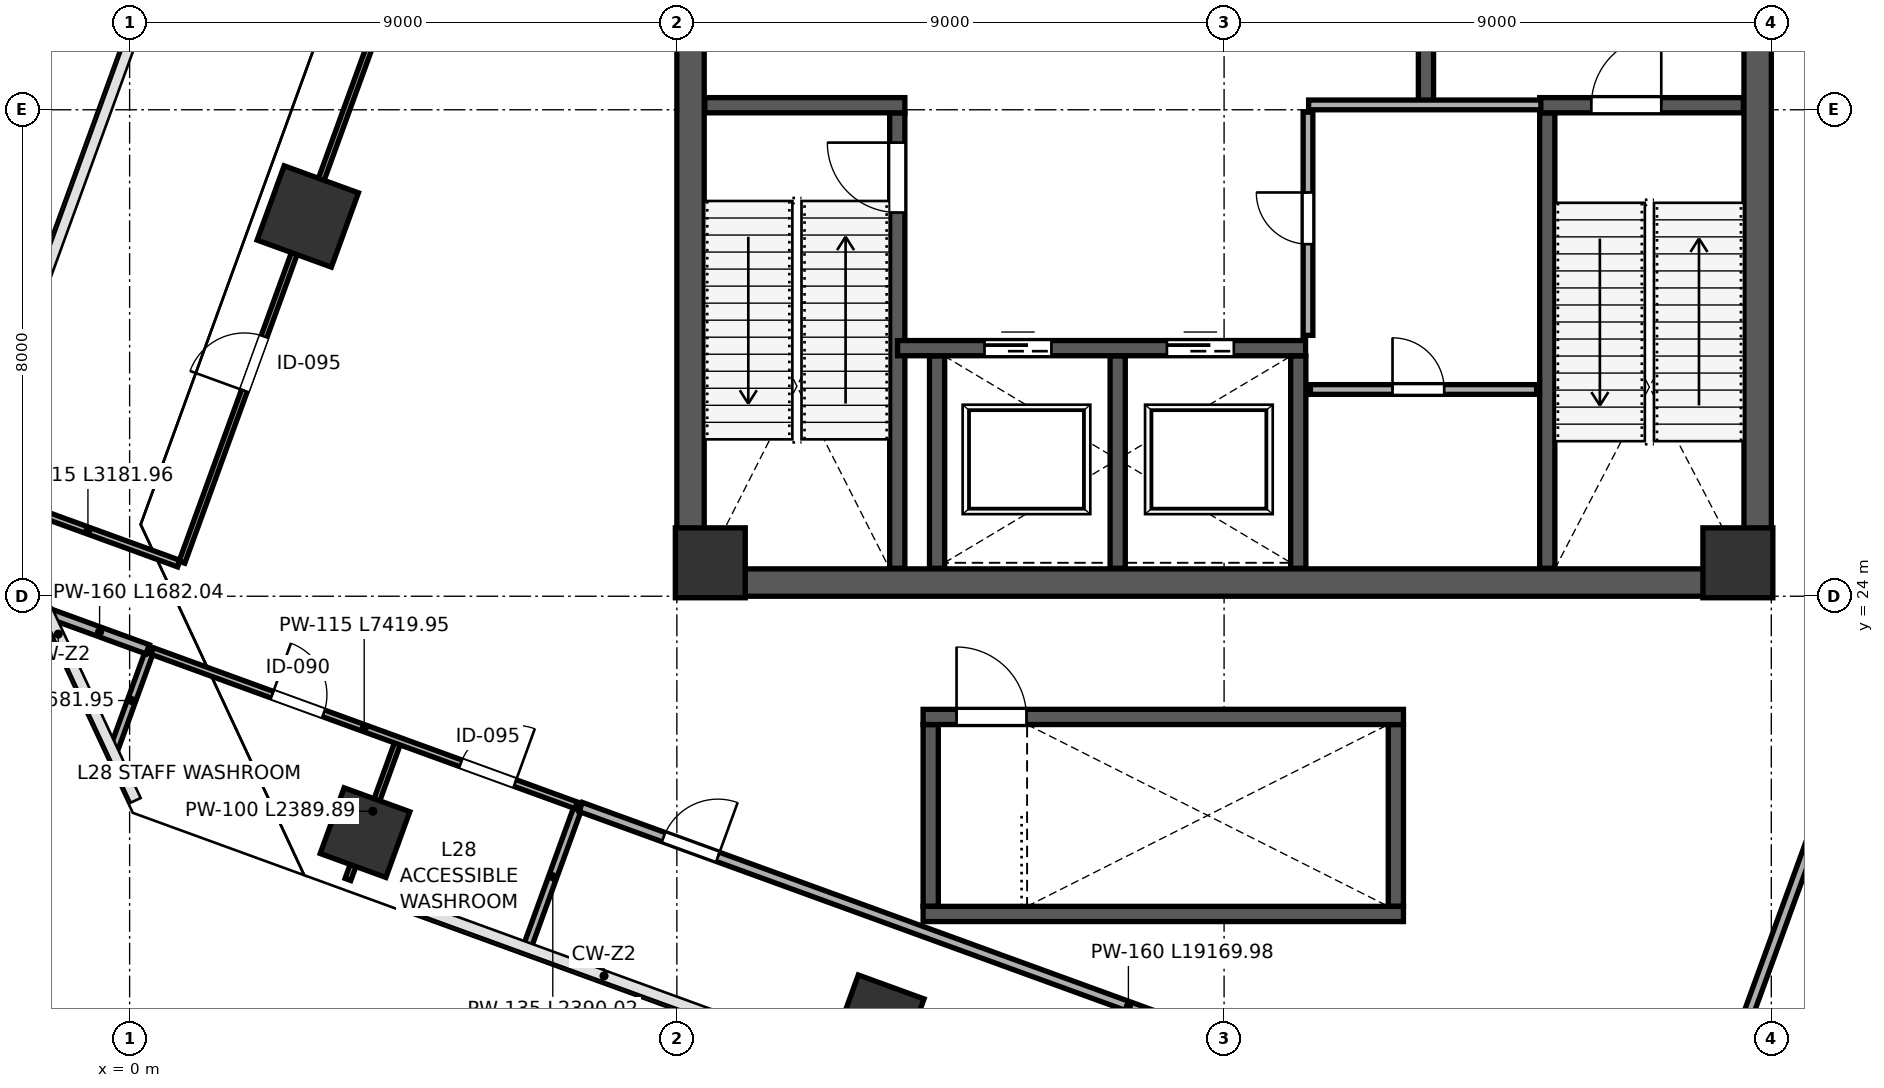
"""IFC4 building model, lengths in metres.
Left out: names, types, materials, properties, quantities, classifications, styles, units other than length and angle.
Written with IfcOpenShell. Run it as: python <this file> out.ifc"""

import sys

from ifc_helpers import new_model, si_unit, direction, frame, frame_2d, origin, origin_2d, place, context, subcontext, project, spatial, rectangle, extrude, source, transform, mapped, element, fill, save


model = new_model("IFC4")
c1 = context("Model", 3, precision=1e-05, world=origin(), true_north=direction((0.0, 1.0)))
c2 = subcontext(c1, "Body", "Model", "MODEL_VIEW")
j1 = project(units=[si_unit("LENGTHUNIT", "METRE"), si_unit("PLANEANGLEUNIT", "RADIAN")], contexts=[c1])
p1 = place(None, origin())
s1 = spatial("IfcSite", under=j1, at=p1, CompositionType="ELEMENT")
p2 = place(p1, origin())
s2 = spatial("IfcBuilding", under=s1, at=p2, CompositionType="ELEMENT")
p3 = place(p2, frame((0.0, 0.0, 127.6)))
s3 = spatial("IfcBuildingStorey", under=s2, at=p3, CompositionType="ELEMENT", Elevation=127.6)
m1 = source(origin(), c2, "Body", "SweptSolid", [
    extrude(rectangle(XDim=1.15, YDim=1.15, at=origin_2d()), origin(), (0.0, 0.0, 1.0), 5.398),
])
for number, where, z_axis, x_axis in (
    (1, (9.55, 24.55, 0.001), (0.0, 0.0, 1.0), (1.0, 0.0, 0.0)),
    (2, (26.45, 24.55, 0.001), (0.0, 0.0, 1.0), (1.0, 0.0, 0.0)),
):
    element("IfcColumn", number, at=place(p3, frame(where, z_axis=z_axis, x_axis=x_axis)), inside=s3, PredefinedType="COLUMN", context=c2, shape_type="MappedRepresentation", body=[
        mapped(m1, transform((0.0, 0.0, 0.0), scale=1.0)),
    ])
m2 = source(origin(), c2, "Body", "SweptSolid", [
    extrude(rectangle(XDim=1.15, YDim=1.15, at=origin_2d()), origin(), (0.0, 0.0, 1.0), 5.398),
])
for number, where, z_axis, x_axis in (
    (3, (3.871, 20.113, 0.001), (0.0, 0.0, 1.0), (-0.94, 0.342, 0.0)),
    (4, (12.328, 17.034, 0.001), (0.0, 0.0, 1.0), (-0.94, 0.342, 0.0)),
):
    element("IfcColumn", number, at=place(p3, frame(where, z_axis=z_axis, x_axis=x_axis)), inside=s3, PredefinedType="COLUMN", context=c2, shape_type="MappedRepresentation", body=[
        mapped(m2, transform((0.0, 0.0, 0.0), scale=1.0)),
    ])
m3 = source(origin(), c2, "Body", "SweptSolid", [
    extrude(rectangle(XDim=1.3, YDim=1.3, at=origin_2d()), origin(), (0.0, 0.0, 1.0), 5.398),
])
p4 = place(p3, frame((2.93, 30.246, 0.001), z_axis=(0.0, 0.0, 1.0), x_axis=(-0.939692620786, 0.342020143326, 0.0)))
e5 = element("IfcColumn", 5, at=p4, inside=s3, PredefinedType="COLUMN", context=c2, shape_type="MappedRepresentation", body=[
    mapped(m3, transform((0.0, 0.0, 0.0), scale=1.0)),
])
p5 = place(p3, frame((9.225, 24.45, 0.0), z_axis=(0.0, 0.0, 1.0), x_axis=(0.0, 1.0, 0.0)))
e6 = element("IfcWall", 6, at=p5, inside=s3, PredefinedType="SHEAR", context=c2, shape_type="SweptSolid", body=[
    extrude(rectangle(XDim=15.1, YDim=0.45, at=frame_2d((7.55, 0.0))), origin(), (0.0, 0.0, 1.0), 5.16),
])
p6 = place(p3, frame((26.775, 24.45, 0.0), z_axis=(0.0, 0.0, 1.0), x_axis=(0.0, 1.0, 0.0)))
e7 = element("IfcWall", 7, at=p6, inside=s3, PredefinedType="SHEAR", context=c2, shape_type="SweptSolid", body=[
    extrude(rectangle(XDim=15.1, YDim=0.45, at=frame_2d((7.55, 0.0))), origin(), (0.0, 0.0, 1.0), 5.16),
])
p7 = place(p6, frame((8.6, 0.0, 0.0)))
e8 = element("IfcOpeningElement", 8, at=p7, cuts=e7, PredefinedType="OPENING", context=c2, shape_type="SweptSolid", body=[
    extrude(rectangle(XDim=1.15, YDim=2.2, at=frame_2d((0.575, 1.1))), frame((0.0, 0.235, 0.0), z_axis=(0.0, -1.0, 0.0), x_axis=(1.0, 0.0, 0.0)), (0.0, 0.0, 1.0), 0.47),
])
p8 = place(p3, frame((9.0, 24.225, 0.0), z_axis=(0.0, 0.0, 1.0), x_axis=(1.0, 0.0, 0.0)))
e9 = element("IfcWall", 9, at=p8, inside=s3, PredefinedType="SHEAR", context=c2, shape_type="SweptSolid", body=[
    extrude(rectangle(XDim=18.0, YDim=0.45, at=frame_2d((9.0, 0.0))), origin(), (0.0, 0.0, 1.0), 5.16),
])
p9 = place(p3, frame((12.625, 24.46, 0.0), z_axis=(0.0, 0.0, 1.0), x_axis=(0.0, 1.0, 0.0)))
e10 = element("IfcWall", 10, at=p9, inside=s3, PredefinedType="SHEAR", context=c2, shape_type="SweptSolid", body=[
    extrude(rectangle(XDim=7.49, YDim=0.25, at=frame_2d((3.745, 0.0))), origin(), (0.0, 0.0, 1.0), 5.16),
])
p10 = place(p9, frame((5.85, 0.0, 0.0)))
e11 = element("IfcOpeningElement", 11, at=p10, cuts=e10, PredefinedType="OPENING", context=c2, shape_type="SweptSolid", body=[
    extrude(rectangle(XDim=1.15, YDim=2.2, at=frame_2d((0.575, 1.1))), frame((0.0, 0.135, 0.0), z_axis=(0.0, -1.0, 0.0), x_axis=(1.0, 0.0, 0.0)), (0.0, 0.0, 1.0), 0.27),
])
p11 = place(p3, frame((9.46, 32.075, 0.0), z_axis=(0.0, 0.0, 1.0), x_axis=(1.0, 0.0, 0.0)))
e12 = element("IfcWall", 12, at=p11, inside=s3, PredefinedType="SHEAR", context=c2, shape_type="SweptSolid", body=[
    extrude(rectangle(XDim=3.29, YDim=0.25, at=frame_2d((1.645, 0.0))), origin(), (0.0, 0.0, 1.0), 5.16),
])
p12 = place(p3, frame((23.315, 24.46, 0.0), z_axis=(0.0, 0.0, 1.0), x_axis=(0.0, 1.0, 0.0)))
e13 = element("IfcWall", 13, at=p12, inside=s3, PredefinedType="SHEAR", context=c2, shape_type="SweptSolid", body=[
    extrude(rectangle(XDim=7.49, YDim=0.25, at=frame_2d((3.745, 0.0))), origin(), (0.0, 0.0, 1.0), 5.16),
])
p13 = place(p3, frame((23.19, 32.075, 0.0), z_axis=(0.0, 0.0, 1.0), x_axis=(1.0, 0.0, 0.0)))
e14 = element("IfcWall", 14, at=p13, inside=s3, PredefinedType="SHEAR", context=c2, shape_type="SweptSolid", body=[
    extrude(rectangle(XDim=3.35, YDim=0.25, at=frame_2d((1.675, 0.0))), origin(), (0.0, 0.0, 1.0), 5.16),
])
p14 = place(p13, frame((0.85, 0.0, 0.0)))
e15 = element("IfcOpeningElement", 15, at=p14, cuts=e14, PredefinedType="OPENING", context=c2, shape_type="SweptSolid", body=[
    extrude(rectangle(XDim=1.15, YDim=2.2, at=frame_2d((0.575, 1.1))), frame((0.0, 0.135, 0.0), z_axis=(0.0, -1.0, 0.0), x_axis=(1.0, 0.0, 0.0)), (0.0, 0.0, 1.0), 0.27),
])
p15 = place(p3, frame((21.32, 32.12, 0.0), z_axis=(0.0, 0.0, 1.0), x_axis=(0.0, 1.0, 0.0)))
e16 = element("IfcWall", 16, at=p15, inside=s3, PredefinedType="SHEAR", context=c2, shape_type="SweptSolid", body=[
    extrude(rectangle(XDim=7.42, YDim=0.25, at=frame_2d((3.71, 0.0))), origin(), (0.0, 0.0, 1.0), 5.16),
])
p16 = place(p15, frame((1.4, 0.0, 0.0)))
e17 = element("IfcOpeningElement", 17, at=p16, cuts=e16, PredefinedType="OPENING", context=c2, shape_type="SweptSolid", body=[
    extrude(rectangle(XDim=1.15, YDim=2.2, at=frame_2d((0.575, 1.1))), frame((0.0, 0.135, 0.0), z_axis=(0.0, -1.0, 0.0), x_axis=(1.0, 0.0, 0.0)), (0.0, 0.0, 1.0), 0.27),
])
p17 = place(p3, frame((12.63, 28.08, 0.0), z_axis=(0.0, 0.0, 1.0), x_axis=(1.0, 0.0, 0.0)))
e18 = element("IfcWall", 18, at=p17, inside=s3, PredefinedType="SHEAR", context=c2, shape_type="SweptSolid", body=[
    extrude(rectangle(XDim=6.71, YDim=0.25, at=frame_2d((3.355, 0.0))), origin(), (0.0, 0.0, 1.0), 5.16),
])
p18 = place(p17, frame((1.43, 0.0, 0.0)))
e19 = element("IfcOpeningElement", 19, at=p18, cuts=e18, PredefinedType="OPENING", context=c2, shape_type="SweptSolid", body=[
    extrude(rectangle(XDim=1.1, YDim=2.2, at=frame_2d((0.55, 1.1))), frame((0.0, 0.135, 0.0), z_axis=(0.0, -1.0, 0.0), x_axis=(1.0, 0.0, 0.0)), (0.0, 0.0, 1.0), 0.27),
])
p19 = place(p17, frame((4.43, 0.0, 0.0)))
e20 = element("IfcOpeningElement", 20, at=p19, cuts=e18, PredefinedType="OPENING", context=c2, shape_type="SweptSolid", body=[
    extrude(rectangle(XDim=1.1, YDim=2.2, at=frame_2d((0.55, 1.1))), frame((0.0, 0.135, 0.0), z_axis=(0.0, -1.0, 0.0), x_axis=(1.0, 0.0, 0.0)), (0.0, 0.0, 1.0), 0.27),
])
for number, where, z_axis, x_axis in (
    (21, (13.28, 24.46, 0.0), (0.0, 0.0, 1.0), (0.0, 1.0, 0.0)),
    (22, (16.25, 24.46, 0.0), (0.0, 0.0, 1.0), (0.0, 1.0, 0.0)),
    (23, (19.22, 24.46, 0.0), (0.0, 0.0, 1.0), (0.0, 1.0, 0.0)),
):
    element("IfcWall", number, at=place(p3, frame(where, z_axis=z_axis, x_axis=x_axis)), inside=s3, PredefinedType="SHEAR", context=c2, shape_type="SweptSolid", body=[
        extrude(rectangle(XDim=3.49, YDim=0.25, at=frame_2d((1.745, 0.0))), origin(), (0.0, 0.0, 1.0), 5.16),
    ])
for number, where, z_axis, x_axis in (
    (24, (13.175, 18.9, 0.0), (0.0, 0.0, 1.0), (0.0, 1.0, 0.0)),
    (25, (20.825, 18.9, 0.0), (0.0, 0.0, 1.0), (0.0, 1.0, 0.0)),
):
    element("IfcWall", number, at=place(p3, frame(where, z_axis=z_axis, x_axis=x_axis)), inside=s3, PredefinedType="SHEAR", context=c2, shape_type="SweptSolid", body=[
        extrude(rectangle(XDim=2.99, YDim=0.25, at=frame_2d((1.495, 0.0))), origin(), (0.0, 0.0, 1.0), 5.16),
    ])
p20 = place(p3, frame((13.05, 18.775, 0.0), z_axis=(0.0, 0.0, 1.0), x_axis=(1.0, 0.0, 0.0)))
e26 = element("IfcWall", 26, at=p20, inside=s3, PredefinedType="SHEAR", context=c2, shape_type="SweptSolid", body=[
    extrude(rectangle(XDim=7.9, YDim=0.25, at=frame_2d((3.95, 0.0))), origin(), (0.0, 0.0, 1.0), 5.16),
])
p21 = place(p3, frame((13.05, 22.015, 0.0), z_axis=(0.0, 0.0, 1.0), x_axis=(1.0, 0.0, 0.0)))
e27 = element("IfcWall", 27, at=p21, inside=s3, PredefinedType="SHEAR", context=c2, shape_type="SweptSolid", body=[
    extrude(rectangle(XDim=7.9, YDim=0.25, at=frame_2d((3.95, 0.0))), origin(), (0.0, 0.0, 1.0), 5.16),
])
p22 = place(p21, frame((0.55, 0.0, 0.0)))
e28 = element("IfcOpeningElement", 28, at=p22, cuts=e27, PredefinedType="OPENING", context=c2, shape_type="SweptSolid", body=[
    extrude(rectangle(XDim=1.15, YDim=2.2, at=frame_2d((0.575, 1.1))), frame((0.0, 0.135, 0.0), z_axis=(0.0, -1.0, 0.0), x_axis=(1.0, 0.0, 0.0)), (0.0, 0.0, 1.0), 0.27),
])
p23 = place(p3, frame((19.39, 32.08, 0.0), z_axis=(0.0, 0.0, 1.0), x_axis=(1.0, 0.0, 0.0)))
e29 = element("IfcWall", 29, at=p23, inside=s3, PredefinedType="PARTITIONING", context=c2, shape_type="SweptSolid", body=[
    extrude(rectangle(XDim=3.82, YDim=0.16, at=frame_2d((1.91, 0.0))), origin(), (0.0, 0.0, 1.0), 5.16),
])
p24 = place(p3, frame((19.38, 28.29, 0.0), z_axis=(0.0, 0.0, 1.0), x_axis=(0.0, 1.0, 0.0)))
e30 = element("IfcWall", 30, at=p24, inside=s3, PredefinedType="PARTITIONING", context=c2, shape_type="SweptSolid", body=[
    extrude(rectangle(XDim=3.67, YDim=0.16, at=frame_2d((1.835, 0.0))), origin(), (0.0, 0.0, 1.0), 5.16),
])
p25 = place(p24, frame((1.5, 0.0, 0.0)))
e31 = element("IfcOpeningElement", 31, at=p25, cuts=e30, PredefinedType="OPENING", context=c2, shape_type="SweptSolid", body=[
    extrude(rectangle(XDim=0.85, YDim=2.1, at=frame_2d((0.425, 1.05))), frame((0.0, 0.09, 0.0), z_axis=(0.0, -1.0, 0.0), x_axis=(1.0, 0.0, 0.0)), (0.0, 0.0, 1.0), 0.18),
])
p26 = place(p3, frame((19.42, 27.4, 0.0), z_axis=(0.0, 0.0, 1.0), x_axis=(1.0, 0.0, 0.0)))
e32 = element("IfcWall", 32, at=p26, inside=s3, PredefinedType="PARTITIONING", context=c2, shape_type="SweptSolid", body=[
    extrude(rectangle(XDim=3.72, YDim=0.16, at=frame_2d((1.86, 0.0))), origin(), (0.0, 0.0, 1.0), 5.16),
])
p27 = place(p26, frame((1.35, 0.0, 0.0)))
e33 = element("IfcOpeningElement", 33, at=p27, cuts=e32, PredefinedType="OPENING", context=c2, shape_type="SweptSolid", body=[
    extrude(rectangle(XDim=0.85, YDim=2.1, at=frame_2d((0.425, 1.05))), frame((0.0, 0.09, 0.0), z_axis=(0.0, -1.0, 0.0), x_axis=(1.0, 0.0, 0.0)), (0.0, 0.0, 1.0), 0.18),
])
p28 = place(p3, frame((-0.255, 21.495, 0.0), z_axis=(0.0, 0.0, 1.0), x_axis=(0.341976142036, 0.939708634779, 0.0)))
e34 = element("IfcWall", 34, at=p28, inside=s3, PredefinedType="PARTITIONING", context=c2, shape_type="SweptSolid", body=[
    extrude(rectangle(XDim=1.682, YDim=0.135, at=frame_2d((0.841, 0.0))), origin(), (0.0, 0.0, 1.0), 5.16),
])
p29 = place(p3, frame((-1.284, 23.702, 0.0), z_axis=(0.0, 0.0, 1.0), x_axis=(0.939708634779, -0.341976142036, 0.0)))
e35 = element("IfcWall", 35, at=p29, inside=s3, PredefinedType="PARTITIONING", context=c2, shape_type="SweptSolid", body=[
    extrude(rectangle(XDim=1.682, YDim=0.16, at=frame_2d((0.841, 0.0))), origin(), (0.0, 0.0, 1.0), 5.16),
])
p30 = place(p3, frame((3.591, 19.342, 0.0), z_axis=(0.0, 0.0, 1.0), x_axis=(0.341915305368, 0.939730772059, 0.0)))
e36 = element("IfcWall", 36, at=p30, inside=s3, PredefinedType="PARTITIONING", context=c2, shape_type="SweptSolid", body=[
    extrude(rectangle(XDim=2.39, YDim=0.1, at=frame_2d((1.195, 0.0))), origin(), (0.0, 0.0, 1.0), 4.395),
])
p31 = place(p3, frame((6.551, 18.265, 0.0), z_axis=(0.0, 0.0, 1.0), x_axis=(0.342005513766, 0.939697945381, 0.0)))
e37 = element("IfcWall", 37, at=p31, inside=s3, PredefinedType="PARTITIONING", context=c2, shape_type="SweptSolid", body=[
    extrude(rectangle(XDim=2.39, YDim=0.135, at=frame_2d((1.195, 0.0))), origin(), (0.0, 0.0, 1.0), 4.395),
])
p32 = place(p3, frame((0.372, 23.1, 0.0), z_axis=(0.0, 0.0, 1.0), x_axis=(0.939692513883, -0.342020437038, 0.0)))
e38 = element("IfcWall", 38, at=p32, inside=s3, PredefinedType="PARTITIONING", context=c2, shape_type="SweptSolid", body=[
    extrude(rectangle(XDim=7.42, YDim=0.115, at=frame_2d((3.71, 0.0))), origin(), (0.0, 0.0, 1.0), 5.16),
])
p33 = place(p32, frame((2.1, 0.0, 0.0)))
e39 = element("IfcOpeningElement", 39, at=p33, cuts=e38, PredefinedType="OPENING", context=c2, shape_type="SweptSolid", body=[
    extrude(rectangle(XDim=0.9, YDim=2.15, at=frame_2d((0.45, 1.075))), frame((0.0, 0.067, 0.0), z_axis=(0.0, -1.0, 0.0), x_axis=(1.0, 0.0, 0.0)), (0.0, 0.0, 1.0), 0.135),
])
p34 = place(p32, frame((5.4, 0.0, 0.0)))
e40 = element("IfcOpeningElement", 40, at=p34, cuts=e38, PredefinedType="OPENING", context=c2, shape_type="SweptSolid", body=[
    extrude(rectangle(XDim=0.95, YDim=2.15, at=frame_2d((0.475, 1.075))), frame((0.0, 0.067, 0.0), z_axis=(0.0, -1.0, 0.0), x_axis=(1.0, 0.0, 0.0)), (0.0, 0.0, 1.0), 0.135),
])
p35 = place(p3, frame((7.419, 20.534, 0.0), z_axis=(0.0, 0.0, 1.0), x_axis=(0.939690753226, -0.34202527436, 0.0)))
e41 = element("IfcWall", 41, at=p35, inside=s3, PredefinedType="PARTITIONING", context=c2, shape_type="SweptSolid", body=[
    extrude(rectangle(XDim=19.17, YDim=0.16, at=frame_2d((9.585, 0.0))), origin(), (0.0, 0.0, 1.0), 5.16),
])
p36 = place(p35, frame((1.45, 0.0, 0.0)))
e42 = element("IfcOpeningElement", 42, at=p36, cuts=e41, PredefinedType="OPENING", context=c2, shape_type="SweptSolid", body=[
    extrude(rectangle(XDim=0.95, YDim=2.15, at=frame_2d((0.475, 1.075))), frame((0.0, 0.09, 0.0), z_axis=(0.0, -1.0, 0.0), x_axis=(1.0, 0.0, 0.0)), (0.0, 0.0, 1.0), 0.18),
])
p37 = place(p3, frame((-2.181, 25.625, 0.0), z_axis=(0.0, 0.0, 1.0), x_axis=(0.939714994714, -0.341958665206, 0.0)))
e43 = element("IfcWall", 43, at=p37, inside=s3, PredefinedType="PARTITIONING", context=c2, shape_type="SweptSolid", body=[
    extrude(rectangle(XDim=3.182, YDim=0.115, at=frame_2d((1.591, 0.0))), origin(), (0.0, 0.0, 1.0), 5.16),
])
p38 = place(p3, frame((0.861, 24.56, 0.0), z_axis=(0.0, 0.0, 1.0), x_axis=(0.342022409736, 0.939691795877, 0.0)))
e44 = element("IfcWall", 44, at=p38, inside=s3, PredefinedType="PARTITIONING", context=c2, shape_type="SweptSolid", body=[
    extrude(rectangle(XDim=24.91, YDim=0.1, at=frame_2d((12.455, 0.0))), origin(), (0.0, 0.0, 1.0), 4.395),
])
p39 = place(p38, frame((3.0, 0.0, 0.0)))
e45 = element("IfcOpeningElement", 45, at=p39, cuts=e44, PredefinedType="OPENING", context=c2, shape_type="SweptSolid", body=[
    extrude(rectangle(XDim=0.95, YDim=2.15, at=frame_2d((0.475, 1.075))), frame((0.0, 0.06, 0.0), z_axis=(0.0, -1.0, 0.0), x_axis=(1.0, 0.0, 0.0)), (0.0, 0.0, 1.0), 0.12),
])
p40 = place(p3, frame((24.64, 11.681, 0.0), z_axis=(0.0, 0.0, 1.0), x_axis=(0.342014151498, 0.939694801611, 0.0)))
e46 = element("IfcWall", 46, at=p40, inside=s3, PredefinedType="PARTITIONING", context=c2, shape_type="SweptSolid", body=[
    extrude(rectangle(XDim=20.68, YDim=0.16, at=frame_2d((10.34, 0.0))), origin(), (0.0, 0.0, 1.0), 5.16),
])
m4 = source(origin(), c2, "Body", "SweptSolid", [
    extrude(rectangle(XDim=1.15, YDim=2.2, at=frame_2d((0.575, 1.1))), frame((0.0, 0.025, 0.0), z_axis=(0.0, -1.0, 0.0), x_axis=(1.0, 0.0, 0.0)), (0.0, 0.0, 1.0), 0.05),
])
p41 = place(p10, origin())
e47 = element("IfcDoor", 47, at=p41, inside=s3, OperationType="SINGLE_SWING_RIGHT", PredefinedType="DOOR", context=c2, shape_type="MappedRepresentation", body=[
    mapped(m4, transform((0.0, 0.0, 0.0), scale=1.0)),
])
fill(e11, e47)
p42 = place(p14, origin())
e48 = element("IfcDoor", 48, at=p42, inside=s3, OperationType="SINGLE_SWING_RIGHT", PredefinedType="DOOR", context=c2, shape_type="MappedRepresentation", body=[
    mapped(m4, transform((0.0, 0.0, 0.0), scale=1.0)),
])
fill(e15, e48)
p43 = place(p22, origin())
e49 = element("IfcDoor", 49, at=p43, inside=s3, OperationType="SINGLE_SWING_LEFT", PredefinedType="DOOR", context=c2, shape_type="MappedRepresentation", body=[
    mapped(m4, transform((0.0, 0.0, 0.0), scale=1.0)),
])
fill(e28, e49)
m5 = source(origin(), c2, "Body", "SweptSolid", [
    extrude(rectangle(XDim=1.1, YDim=2.2, at=frame_2d((0.55, 1.1))), frame((0.0, 0.025, 0.0), z_axis=(0.0, -1.0, 0.0), x_axis=(1.0, 0.0, 0.0)), (0.0, 0.0, 1.0), 0.05),
])
p44 = place(p18, origin())
e50 = element("IfcDoor", 50, at=p44, inside=s3, OperationType="SLIDING_TO_LEFT", PredefinedType="DOOR", context=c2, shape_type="MappedRepresentation", body=[
    mapped(m5, transform((0.0, 0.0, 0.0), scale=1.0)),
])
fill(e19, e50)
p45 = place(p19, origin())
e51 = element("IfcDoor", 51, at=p45, inside=s3, OperationType="SLIDING_TO_RIGHT", PredefinedType="DOOR", context=c2, shape_type="MappedRepresentation", body=[
    mapped(m5, transform((0.0, 0.0, 0.0), scale=1.0)),
])
fill(e20, e51)
m6 = source(origin(), c2, "Body", "SweptSolid", [
    extrude(rectangle(XDim=0.85, YDim=2.1, at=frame_2d((0.425, 1.05))), frame((0.0, 0.025, 0.0), z_axis=(0.0, -1.0, 0.0), x_axis=(1.0, 0.0, 0.0)), (0.0, 0.0, 1.0), 0.05),
])
p46 = place(p27, origin())
e52 = element("IfcDoor", 52, at=p46, inside=s3, OperationType="SINGLE_SWING_LEFT", PredefinedType="DOOR", context=c2, shape_type="MappedRepresentation", body=[
    mapped(m6, transform((0.0, 0.0, 0.0), scale=1.0)),
])
fill(e33, e52)
p47 = place(p25, origin())
e53 = element("IfcDoor", 53, at=p47, inside=s3, OperationType="SINGLE_SWING_RIGHT", PredefinedType="DOOR", context=c2, shape_type="MappedRepresentation", body=[
    mapped(m6, transform((0.0, 0.0, 0.0), scale=1.0)),
])
fill(e31, e53)
m7 = source(origin(), c2, "Body", "SweptSolid", [
    extrude(rectangle(XDim=0.9, YDim=2.15, at=frame_2d((0.45, 1.075))), frame((0.0, 0.025, 0.0), z_axis=(0.0, -1.0, 0.0), x_axis=(1.0, 0.0, 0.0)), (0.0, 0.0, 1.0), 0.05),
])
p48 = place(p33, origin())
e54 = element("IfcDoor", 54, at=p48, inside=s3, OperationType="SINGLE_SWING_LEFT", PredefinedType="DOOR", context=c2, shape_type="MappedRepresentation", body=[
    mapped(m7, transform((0.0, 0.0, 0.0), scale=1.0)),
])
fill(e39, e54)
m8 = source(origin(), c2, "Body", "SweptSolid", [
    extrude(rectangle(XDim=0.95, YDim=2.15, at=frame_2d((0.475, 1.075))), frame((0.0, 0.025, 0.0), z_axis=(0.0, -1.0, 0.0), x_axis=(1.0, 0.0, 0.0)), (0.0, 0.0, 1.0), 0.05),
])
p49 = place(p34, origin())
e55 = element("IfcDoor", 55, at=p49, inside=s3, OperationType="SINGLE_SWING_RIGHT", PredefinedType="DOOR", context=c2, shape_type="MappedRepresentation", body=[
    mapped(m8, transform((0.0, 0.0, 0.0), scale=1.0)),
])
fill(e40, e55)
m9 = source(origin(), c2, "Body", "SweptSolid", [
    extrude(rectangle(XDim=0.95, YDim=2.15, at=frame_2d((0.475, 1.075))), frame((0.0, 0.025, 0.0), z_axis=(0.0, -1.0, 0.0), x_axis=(1.0, 0.0, 0.0)), (0.0, 0.0, 1.0), 0.05),
])
p50 = place(p36, origin())
e56 = element("IfcDoor", 56, at=p50, inside=s3, OperationType="SINGLE_SWING_RIGHT", PredefinedType="DOOR", context=c2, shape_type="MappedRepresentation", body=[
    mapped(m9, transform((0.0, 0.0, 0.0), scale=1.0)),
])
fill(e42, e56)
p51 = place(p39, origin())
e57 = element("IfcDoor", 57, at=p51, inside=s3, OperationType="SINGLE_SWING_LEFT", PredefinedType="DOOR", context=c2, shape_type="MappedRepresentation", body=[
    mapped(m8, transform((0.0, 0.0, 0.0), scale=1.0)),
])
fill(e45, e57)
save(model, sys.argv[1])
